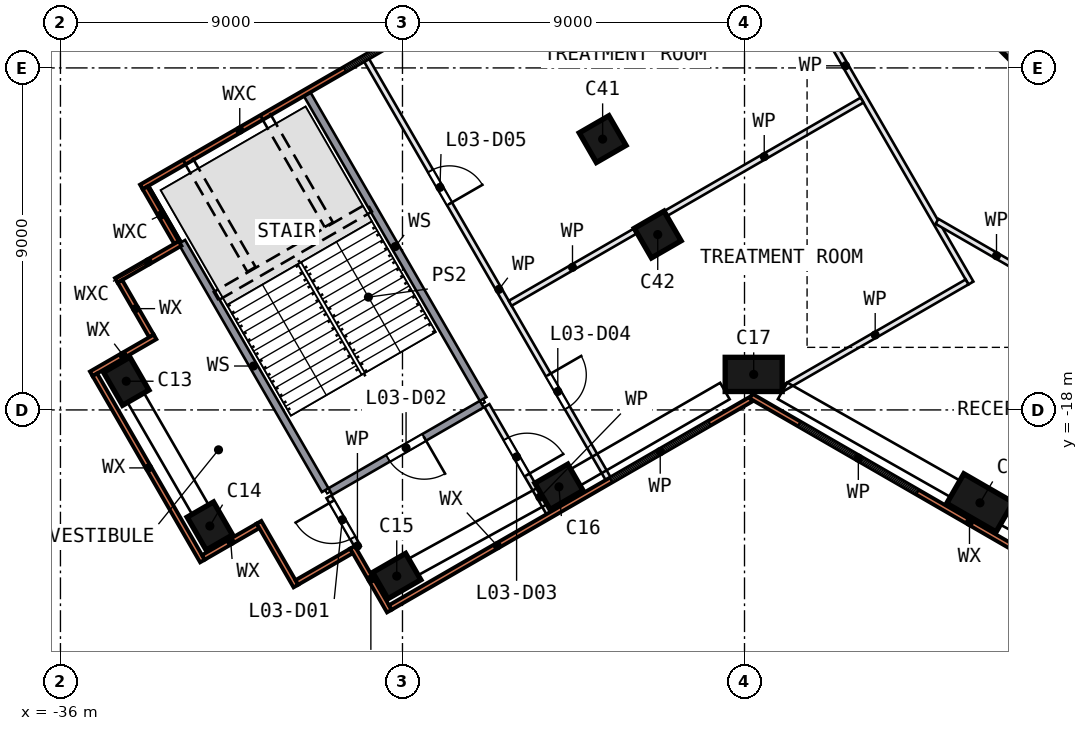
"""IFC4 building model, lengths in metres.
Left out: names, types, materials, properties, quantities, classifications, styles, units other than length and angle.
Written with IfcOpenShell. Run it as: python <this file> out.ifc"""

import sys

from ifc_helpers import new_model, si_unit, direction, frame, frame_2d, origin, origin_2d, place, context, subcontext, project, spatial, rectangle, extrude, element, fill, save


model = new_model("IFC4")
c1 = context("Model", 3, precision=1e-05, world=origin(), true_north=direction((0.0, 1.0)))
c2 = subcontext(c1, "Body", "Model", "MODEL_VIEW")
j1 = project(units=[si_unit("LENGTHUNIT", "METRE"), si_unit("PLANEANGLEUNIT", "RADIAN")], contexts=[c1])
p1 = place(None, origin())
s1 = spatial("IfcSite", under=j1, at=p1, CompositionType="ELEMENT")
p2 = place(p1, origin())
s2 = spatial("IfcBuilding", under=s1, at=p2, CompositionType="ELEMENT")
p3 = place(p2, frame((0.0, 0.0, 19.0)))
s3 = spatial("IfcBuildingStorey", under=s2, at=p3, CompositionType="ELEMENT", Elevation=19.0)
for number, where, z_axis, x_axis in (
    (1, (-34.269, -17.245, 0.0), (0.0, 0.0, 1.0), (0.5, -0.866, 0.0)),
    (2, (-32.069, -21.055, 0.0), (0.0, 0.0, 1.0), (0.5, -0.866, 0.0)),
    (3, (-27.151, -22.373, 0.0), (0.0, 0.0, 1.0), (0.866, 0.5, 0.0)),
    (4, (-22.883, -20.024, 0.0), (0.0, 0.0, 1.0), (0.866, 0.5, 0.0)),
):
    element("IfcColumn", number, at=place(p3, frame(where, z_axis=z_axis, x_axis=x_axis)), inside=s3, PredefinedType="COLUMN", context=c2, shape_type="SweptSolid", body=[
        extrude(rectangle(XDim=1.0, YDim=0.8, at=origin_2d()), origin(), (0.0, 0.0, 1.0), 4.05),
    ])
for number, where, z_axis, x_axis in (
    (5, (-17.758, -17.065, 0.0), (0.0, 0.0, 1.0), (-1.0, 0.0, 0.0)),
    (6, (-11.804, -20.445, 0.0), (0.0, 0.0, 1.0), (0.866, -0.5, 0.0)),
):
    element("IfcColumn", number, at=place(p3, frame(where, z_axis=z_axis, x_axis=x_axis)), inside=s3, PredefinedType="COLUMN", context=c2, shape_type="SweptSolid", body=[
        extrude(rectangle(XDim=1.5, YDim=0.9, at=origin_2d()), origin(), (0.0, 0.0, 1.0), 4.05),
    ])
for number, where, z_axis, x_axis in (
    (7, (-21.733, -10.873, 0.0), (0.0, 0.0, 1.0), (-0.866, -0.5, 0.0)),
    (8, (-20.283, -13.385, 0.0), (0.0, 0.0, 1.0), (-0.866, -0.5, 0.0)),
):
    element("IfcColumn", number, at=place(p3, frame(where, z_axis=z_axis, x_axis=x_axis)), inside=s3, PredefinedType="COLUMN", context=c2, shape_type="SweptSolid", body=[
        extrude(rectangle(XDim=0.9, YDim=0.9, at=origin_2d()), origin(), (0.0, 0.0, 1.0), 4.05),
    ])
p4 = place(p3, frame((-13.682, -5.481, 0.0), z_axis=(0.0, 0.0, 1.0), x_axis=(0.707106781, -0.707106781, 0.0)))
e9 = element("IfcWall", 9, at=p4, inside=s3, PredefinedType="SHEAR", context=c2, shape_type="SweptSolid", body=[
    extrude(rectangle(XDim=11.598, YDim=0.9, at=frame_2d((5.799, 0.0))), origin(), (0.0, 0.0, 1.0), 4.5),
])
p5 = place(p4, frame((2.099, 0.0, 0.0)))
e10 = element("IfcOpeningElement", 10, at=p5, cuts=e9, PredefinedType="OPENING", context=c2, shape_type="SweptSolid", body=[
    extrude(rectangle(XDim=1.2, YDim=2.1, at=frame_2d((0.6, 1.05))), frame((0.0, 0.46, 0.0), z_axis=(0.0, -1.0, 0.0), x_axis=(1.0, 0.0, 0.0)), (0.0, 0.0, 1.0), 0.92),
])
p6 = place(p3, frame((-23.995, -6.429, 0.0), z_axis=(0.0, 0.0, 1.0), x_axis=(-0.866018753, -0.500011519, 0.0)))
e11 = element("IfcWall", 11, at=p6, inside=s3, PredefinedType="SOLIDWALL", context=c2, shape_type="SweptSolid", body=[
    extrude(rectangle(XDim=11.405, YDim=0.14, at=frame_2d((5.703, 0.0))), origin(), (0.0, 0.0, 1.0), 4.05),
])
p7 = place(p6, frame((1.623, 0.0, 0.9)))
e12 = element("IfcOpeningElement", 12, at=p7, cuts=e11, PredefinedType="OPENING", context=c2, shape_type="SweptSolid", body=[
    extrude(rectangle(XDim=3.6, YDim=2.4, at=frame_2d((1.8, 1.2))), frame((0.0, 0.08, 0.0), z_axis=(0.0, -1.0, 0.0), x_axis=(1.0, 0.0, 0.0)), (0.0, 0.0, 1.0), 0.16),
])
p8 = place(p3, frame((-33.777, -12.157, 0.0), z_axis=(0.0, 0.0, 1.0), x_axis=(0.499887958, -0.866090081, 0.0)))
e13 = element("IfcWall", 13, at=p8, inside=s3, PredefinedType="SOLIDWALL", context=c2, shape_type="SweptSolid", body=[
    extrude(rectangle(XDim=1.66, YDim=0.14, at=frame_2d((0.83, 0.0))), origin(), (0.0, 0.0, 1.0), 4.05),
])
p9 = place(p3, frame((-32.851, -13.62, 0.0), z_axis=(0.0, 0.0, 1.0), x_axis=(-0.866011627, -0.500023862, 0.0)))
e14 = element("IfcWall", 14, at=p9, inside=s3, PredefinedType="SOLIDWALL", context=c2, shape_type="SweptSolid", body=[
    extrude(rectangle(XDim=1.94, YDim=0.14, at=frame_2d((0.97, 0.0))), origin(), (0.0, 0.0, 1.0), 4.05),
])
p10 = place(p3, frame((-34.436, -14.616, 0.0), z_axis=(0.0, 0.0, 1.0), x_axis=(0.500061949, -0.865989634, 0.0)))
e15 = element("IfcWall", 15, at=p10, inside=s3, PredefinedType="SOLIDWALL", context=c2, shape_type="SweptSolid", body=[
    extrude(rectangle(XDim=1.66, YDim=0.14, at=frame_2d((0.83, 0.0))), origin(), (0.0, 0.0, 1.0), 4.05),
])
p11 = place(p3, frame((-33.51, -16.079, 0.0), z_axis=(0.0, 0.0, 1.0), x_axis=(-0.866011627, -0.500023862, 0.0)))
e16 = element("IfcWall", 16, at=p11, inside=s3, PredefinedType="SOLIDWALL", context=c2, shape_type="SweptSolid", body=[
    extrude(rectangle(XDim=1.94, YDim=0.14, at=frame_2d((0.97, 0.0))), origin(), (0.0, 0.0, 1.0), 4.05),
])
p12 = place(p3, frame((-35.094, -17.075, 0.0), z_axis=(0.0, 0.0, 1.0), x_axis=(0.499998748, -0.866026127, 0.0)))
e17 = element("IfcWall", 17, at=p12, inside=s3, PredefinedType="SOLIDWALL", context=c2, shape_type="SweptSolid", body=[
    extrude(rectangle(XDim=5.66, YDim=0.14, at=frame_2d((2.83, 0.0))), origin(), (0.0, 0.0, 1.0), 4.05),
])
p13 = place(p3, frame((-32.239, -21.881, 0.0), z_axis=(0.0, 0.0, 1.0), x_axis=(0.866026406, 0.499998264, 0.0)))
e18 = element("IfcWall", 18, at=p13, inside=s3, PredefinedType="SOLIDWALL", context=c2, shape_type="SweptSolid", body=[
    extrude(rectangle(XDim=1.66, YDim=0.14, at=frame_2d((0.83, 0.0))), origin(), (0.0, 0.0, 1.0), 4.05),
])
p14 = place(p3, frame((-30.775, -20.955, 0.0), z_axis=(0.0, 0.0, 1.0), x_axis=(0.499969368, -0.866043088, 0.0)))
e19 = element("IfcWall", 19, at=p14, inside=s3, PredefinedType="SOLIDWALL", context=c2, shape_type="SweptSolid", body=[
    extrude(rectangle(XDim=1.94, YDim=0.14, at=frame_2d((0.97, 0.0))), origin(), (0.0, 0.0, 1.0), 4.05),
])
p15 = place(p3, frame((-29.78, -22.54, 0.0), z_axis=(0.0, 0.0, 1.0), x_axis=(0.865989634, 0.500061949, 0.0)))
e20 = element("IfcWall", 20, at=p15, inside=s3, PredefinedType="SOLIDWALL", context=c2, shape_type="SweptSolid", body=[
    extrude(rectangle(XDim=1.66, YDim=0.14, at=frame_2d((0.83, 0.0))), origin(), (0.0, 0.0, 1.0), 4.05),
])
p16 = place(p3, frame((-28.317, -21.614, 0.0), z_axis=(0.0, 0.0, 1.0), x_axis=(0.499969368, -0.866043088, 0.0)))
e21 = element("IfcWall", 21, at=p16, inside=s3, PredefinedType="SOLIDWALL", context=c2, shape_type="SweptSolid", body=[
    extrude(rectangle(XDim=1.94, YDim=0.14, at=frame_2d((0.97, 0.0))), origin(), (0.0, 0.0, 1.0), 4.05),
])
p17 = place(p3, frame((-27.321, -23.198, 0.0), z_axis=(0.0, 0.0, 1.0), x_axis=(0.866030546, 0.499991093, 0.0)))
e22 = element("IfcWall", 22, at=p17, inside=s3, PredefinedType="SOLIDWALL", context=c2, shape_type="SweptSolid", body=[
    extrude(rectangle(XDim=10.961, YDim=0.14, at=frame_2d((5.48, 0.0))), origin(), (0.0, 0.0, 1.0), 4.05),
])
p18 = place(p17, frame((6.702, 0.0, 0.9)))
e23 = element("IfcOpeningElement", 23, at=p18, cuts=e22, PredefinedType="OPENING", context=c2, shape_type="SweptSolid", body=[
    extrude(rectangle(XDim=3.0, YDim=2.4, at=frame_2d((1.5, 1.2))), frame((0.0, 0.08, 0.0), z_axis=(0.0, -1.0, 0.0), x_axis=(1.0, 0.0, 0.0)), (0.0, 0.0, 1.0), 0.16),
])
p19 = place(p3, frame((-17.828, -17.637, 0.0), z_axis=(0.0, 0.0, 1.0), x_axis=(0.866029009, -0.499993756, 0.0)))
e24 = element("IfcWall", 24, at=p19, inside=s3, PredefinedType="SOLIDWALL", context=c2, shape_type="SweptSolid", body=[
    extrude(rectangle(XDim=13.242, YDim=0.14, at=frame_2d((6.621, 0.0))), origin(), (0.0, 0.0, 1.0), 4.05),
])
p20 = place(p19, frame((1.46, 0.0, 0.9)))
e25 = element("IfcOpeningElement", 25, at=p20, cuts=e24, PredefinedType="OPENING", context=c2, shape_type="SweptSolid", body=[
    extrude(rectangle(XDim=3.6, YDim=2.4, at=frame_2d((1.8, 1.2))), frame((0.0, 0.08, 0.0), z_axis=(0.0, -1.0, 0.0), x_axis=(1.0, 0.0, 0.0)), (0.0, 0.0, 1.0), 0.16),
])
p21 = place(p19, frame((8.215, 0.0, 0.9)))
e26 = element("IfcOpeningElement", 26, at=p21, cuts=e24, PredefinedType="OPENING", context=c2, shape_type="SweptSolid", body=[
    extrude(rectangle(XDim=3.0, YDim=2.4, at=frame_2d((1.5, 1.2))), frame((0.0, 0.08, 0.0), z_axis=(0.0, -1.0, 0.0), x_axis=(1.0, 0.0, 0.0)), (0.0, 0.0, 1.0), 0.16),
])
p22 = place(p3, frame((-32.807, -13.577, 0.0), z_axis=(0.0, 0.0, 1.0), x_axis=(0.50000534, -0.866022321, 0.0)))
e27 = element("IfcWall", 27, at=p22, inside=s3, PredefinedType="SOLIDWALL", context=c2, shape_type="SweptSolid", body=[
    extrude(rectangle(XDim=7.545, YDim=0.2, at=frame_2d((3.773, 0.0))), origin(), (0.0, 0.0, 1.0), 4.05),
])
p23 = place(p3, frame((-28.162, -21.623, 0.0), z_axis=(0.0, 0.0, 1.0), x_axis=(-0.499877454, 0.866096144, 0.0)))
e28 = element("IfcWall", 28, at=p23, inside=s3, PredefinedType="PARTITIONING", context=c2, shape_type="SweptSolid", body=[
    extrude(rectangle(XDim=1.545, YDim=0.15, at=frame_2d((0.773, 0.0))), origin(), (0.0, 0.0, 1.0), 4.05),
])
p24 = place(p23, frame((0.295, 0.0, 0.0)))
e29 = element("IfcOpeningElement", 29, at=p24, cuts=e28, PredefinedType="OPENING", context=c2, shape_type="SweptSolid", body=[
    extrude(rectangle(XDim=1.1, YDim=2.1, at=frame_2d((0.55, 1.05))), frame((0.0, 0.085, 0.0), z_axis=(0.0, -1.0, 0.0), x_axis=(1.0, 0.0, 0.0)), (0.0, 0.0, 1.0), 0.17),
])
p25 = place(p3, frame((-24.914, -17.848, 0.0), z_axis=(0.0, 0.0, 1.0), x_axis=(-0.86601677, -0.500014953, 0.0)))
e30 = element("IfcWall", 30, at=p25, inside=s3, PredefinedType="SOLIDWALL", context=c2, shape_type="SweptSolid", body=[
    extrude(rectangle(XDim=4.6, YDim=0.2, at=frame_2d((2.3, 0.0))), origin(), (0.0, 0.0, 1.0), 4.05),
])
p26 = place(p25, frame((1.75, 0.0, 0.0)))
e31 = element("IfcOpeningElement", 31, at=p26, cuts=e30, PredefinedType="OPENING", context=c2, shape_type="SweptSolid", body=[
    extrude(rectangle(XDim=1.1, YDim=2.1, at=frame_2d((0.55, 1.05))), frame((0.0, 0.11, 0.0), z_axis=(0.0, -1.0, 0.0), x_axis=(1.0, 0.0, 0.0)), (0.0, 0.0, 1.0), 0.22),
])
p27 = place(p3, frame((-24.877, -17.712, 0.0), z_axis=(0.0, 0.0, 1.0), x_axis=(-0.499984148, 0.866034555, 0.0)))
e32 = element("IfcWall", 32, at=p27, inside=s3, PredefinedType="SOLIDWALL", context=c2, shape_type="SweptSolid", body=[
    extrude(rectangle(XDim=9.26, YDim=0.2, at=frame_2d((4.63, 0.0))), origin(), (0.0, 0.0, 1.0), 4.05),
])
p28 = place(p3, frame((-24.777, -17.885, 0.0), z_axis=(0.0, 0.0, 1.0), x_axis=(0.499996863, -0.866027215, 0.0)))
e33 = element("IfcWall", 33, at=p28, inside=s3, PredefinedType="PARTITIONING", context=c2, shape_type="SweptSolid", body=[
    extrude(rectangle(XDim=3.26, YDim=0.15, at=frame_2d((1.63, 0.0))), origin(), (0.0, 0.0, 1.0), 4.05),
])
p29 = place(p28, frame((1.01, 0.0, 0.0)))
e34 = element("IfcOpeningElement", 34, at=p29, cuts=e33, PredefinedType="OPENING", context=c2, shape_type="SweptSolid", body=[
    extrude(rectangle(XDim=1.1, YDim=2.1, at=frame_2d((0.55, 1.05))), frame((0.0, 0.085, 0.0), z_axis=(0.0, -1.0, 0.0), x_axis=(1.0, 0.0, 0.0)), (0.0, 0.0, 1.0), 0.17),
])
p30 = place(p3, frame((-27.948, -8.792, 0.0), z_axis=(0.0, 0.0, 1.0), x_axis=(0.499991053, -0.866030569, 0.0)))
e35 = element("IfcWall", 35, at=p30, inside=s3, PredefinedType="PARTITIONING", context=c2, shape_type="SweptSolid", body=[
    extrude(rectangle(XDim=12.72, YDim=0.15, at=frame_2d((6.36, 0.0))), origin(), (0.0, 0.0, 1.0), 4.05),
])
p31 = place(p30, frame((9.57, 0.0, 0.0)))
e36 = element("IfcOpeningElement", 36, at=p31, cuts=e35, PredefinedType="OPENING", context=c2, shape_type="SweptSolid", body=[
    extrude(rectangle(XDim=1.0, YDim=2.1, at=frame_2d((0.5, 1.05))), frame((0.0, 0.085, 0.0), z_axis=(0.0, -1.0, 0.0), x_axis=(1.0, 0.0, 0.0)), (0.0, 0.0, 1.0), 0.17),
])
p32 = place(p30, frame((3.37, 0.0, 0.0)))
e37 = element("IfcOpeningElement", 37, at=p32, cuts=e35, PredefinedType="OPENING", context=c2, shape_type="SweptSolid", body=[
    extrude(rectangle(XDim=1.0, YDim=2.1, at=frame_2d((0.5, 1.05))), frame((0.0, 0.085, 0.0), z_axis=(0.0, -1.0, 0.0), x_axis=(1.0, 0.0, 0.0)), (0.0, 0.0, 1.0), 0.17),
])
p33 = place(p3, frame((-18.642, -3.228, 0.0), z_axis=(0.0, 0.0, 1.0), x_axis=(0.499988223, -0.866032203, 0.0)))
e38 = element("IfcWall", 38, at=p33, inside=s3, PredefinedType="PARTITIONING", context=c2, shape_type="SweptSolid", body=[
    extrude(rectangle(XDim=13.2, YDim=0.15, at=frame_2d((6.6, 0.0))), origin(), (0.0, 0.0, 1.0), 4.05),
])
p34 = place(p3, frame((-16.978, -17.424, 0.0), z_axis=(0.0, 0.0, 1.0), x_axis=(0.866008599, 0.500029105, 0.0)))
e39 = element("IfcWall", 39, at=p34, inside=s3, PredefinedType="PARTITIONING", context=c2, shape_type="SweptSolid", body=[
    extrude(rectangle(XDim=5.582, YDim=0.15, at=frame_2d((2.791, 0.0))), origin(), (0.0, 0.0, 1.0), 4.05),
])
p35 = place(p3, frame((-20.886, -13.3, 0.0), z_axis=(0.0, 0.0, 1.0), x_axis=(-0.866012734, -0.500021944, 0.0)))
e40 = element("IfcWall", 40, at=p35, inside=s3, PredefinedType="PARTITIONING", context=c2, shape_type="SweptSolid", body=[
    extrude(rectangle(XDim=3.787, YDim=0.15, at=frame_2d((1.894, 0.0))), origin(), (0.0, 0.0, 1.0), 4.05),
])
p36 = place(p3, frame((-14.906, -9.848, 0.0), z_axis=(0.0, 0.0, 1.0), x_axis=(-0.866038559, -0.499977214, 0.0)))
e41 = element("IfcWall", 41, at=p36, inside=s3, PredefinedType="PARTITIONING", context=c2, shape_type="SweptSolid", body=[
    extrude(rectangle(XDim=5.945, YDim=0.15, at=frame_2d((2.973, 0.0))), origin(), (0.0, 0.0, 1.0), 4.05),
])
p37 = place(p3, frame((-4.823, -17.721, 0.0), z_axis=(0.0, 0.0, 1.0), x_axis=(-0.866037142, 0.499979668, 0.0)))
e42 = element("IfcWall", 42, at=p37, inside=s3, PredefinedType="PARTITIONING", context=c2, shape_type="SweptSolid", body=[
    extrude(rectangle(XDim=9.367, YDim=0.15, at=frame_2d((4.683, 0.0))), origin(), (0.0, 0.0, 1.0), 4.05),
])
p38 = place(p37, frame((3.75, 0.0, 0.0)))
e43 = element("IfcOpeningElement", 43, at=p38, cuts=e42, PredefinedType="OPENING", context=c2, shape_type="SweptSolid", body=[
    extrude(rectangle(XDim=1.8, YDim=2.1, at=frame_2d((0.9, 1.05))), frame((0.0, 0.085, 0.0), z_axis=(0.0, -1.0, 0.0), x_axis=(1.0, 0.0, 0.0)), (0.0, 0.0, 1.0), 0.17),
])
p39 = place(p7, origin())
e44 = element("IfcWindow", 44, at=p39, inside=s3, PartitioningType="SINGLE_PANEL", PredefinedType="WINDOW", context=c2, shape_type="SweptSolid", body=[
    extrude(rectangle(XDim=3.6, YDim=2.4, at=frame_2d((1.8, 1.2))), frame((0.0, 0.03, 0.0), z_axis=(0.0, -1.0, 0.0), x_axis=(1.0, 0.0, 0.0)), (0.0, 0.0, 1.0), 0.06),
])
fill(e12, e44)
p40 = place(p18, origin())
e45 = element("IfcWindow", 45, at=p40, inside=s3, PartitioningType="SINGLE_PANEL", PredefinedType="WINDOW", context=c2, shape_type="SweptSolid", body=[
    extrude(rectangle(XDim=3.0, YDim=2.4, at=frame_2d((1.5, 1.2))), frame((0.0, 0.03, 0.0), z_axis=(0.0, -1.0, 0.0), x_axis=(1.0, 0.0, 0.0)), (0.0, 0.0, 1.0), 0.06),
])
fill(e23, e45)
p41 = place(p20, origin())
e46 = element("IfcWindow", 46, at=p41, inside=s3, PartitioningType="SINGLE_PANEL", PredefinedType="WINDOW", context=c2, shape_type="SweptSolid", body=[
    extrude(rectangle(XDim=3.6, YDim=2.4, at=frame_2d((1.8, 1.2))), frame((0.0, 0.03, 0.0), z_axis=(0.0, -1.0, 0.0), x_axis=(1.0, 0.0, 0.0)), (0.0, 0.0, 1.0), 0.06),
])
fill(e25, e46)
p42 = place(p24, origin())
e47 = element("IfcDoor", 47, at=p42, inside=s3, OperationType="SINGLE_SWING_RIGHT", PredefinedType="DOOR", context=c2, shape_type="SweptSolid", body=[
    extrude(rectangle(XDim=1.1, YDim=2.1, at=frame_2d((0.55, 1.05))), frame((0.0, 0.025, 0.0), z_axis=(0.0, -1.0, 0.0), x_axis=(1.0, 0.0, 0.0)), (0.0, 0.0, 1.0), 0.05),
])
fill(e29, e47)
p43 = place(p26, origin())
e48 = element("IfcDoor", 48, at=p43, inside=s3, OperationType="SINGLE_SWING_LEFT", PredefinedType="DOOR", context=c2, shape_type="SweptSolid", body=[
    extrude(rectangle(XDim=1.1, YDim=2.1, at=frame_2d((0.55, 1.05))), frame((0.0, 0.025, 0.0), z_axis=(0.0, -1.0, 0.0), x_axis=(1.0, 0.0, 0.0)), (0.0, 0.0, 1.0), 0.05),
])
fill(e31, e48)
p44 = place(p29, origin())
e49 = element("IfcDoor", 49, at=p44, inside=s3, OperationType="SINGLE_SWING_RIGHT", PredefinedType="DOOR", context=c2, shape_type="SweptSolid", body=[
    extrude(rectangle(XDim=1.1, YDim=2.1, at=frame_2d((0.55, 1.05))), frame((0.0, 0.025, 0.0), z_axis=(0.0, -1.0, 0.0), x_axis=(1.0, 0.0, 0.0)), (0.0, 0.0, 1.0), 0.05),
])
fill(e34, e49)
p45 = place(p31, origin())
e50 = element("IfcDoor", 50, at=p45, inside=s3, OperationType="SINGLE_SWING_LEFT", PredefinedType="DOOR", context=c2, shape_type="SweptSolid", body=[
    extrude(rectangle(XDim=1.0, YDim=2.1, at=frame_2d((0.5, 1.05))), frame((0.0, 0.025, 0.0), z_axis=(0.0, -1.0, 0.0), x_axis=(1.0, 0.0, 0.0)), (0.0, 0.0, 1.0), 0.05),
])
fill(e36, e50)
p46 = place(p32, origin())
e51 = element("IfcDoor", 51, at=p46, inside=s3, OperationType="SINGLE_SWING_RIGHT", PredefinedType="DOOR", context=c2, shape_type="SweptSolid", body=[
    extrude(rectangle(XDim=1.0, YDim=2.1, at=frame_2d((0.5, 1.05))), frame((0.0, 0.025, 0.0), z_axis=(0.0, -1.0, 0.0), x_axis=(1.0, 0.0, 0.0)), (0.0, 0.0, 1.0), 0.05),
])
fill(e37, e51)
save(model, sys.argv[1])
